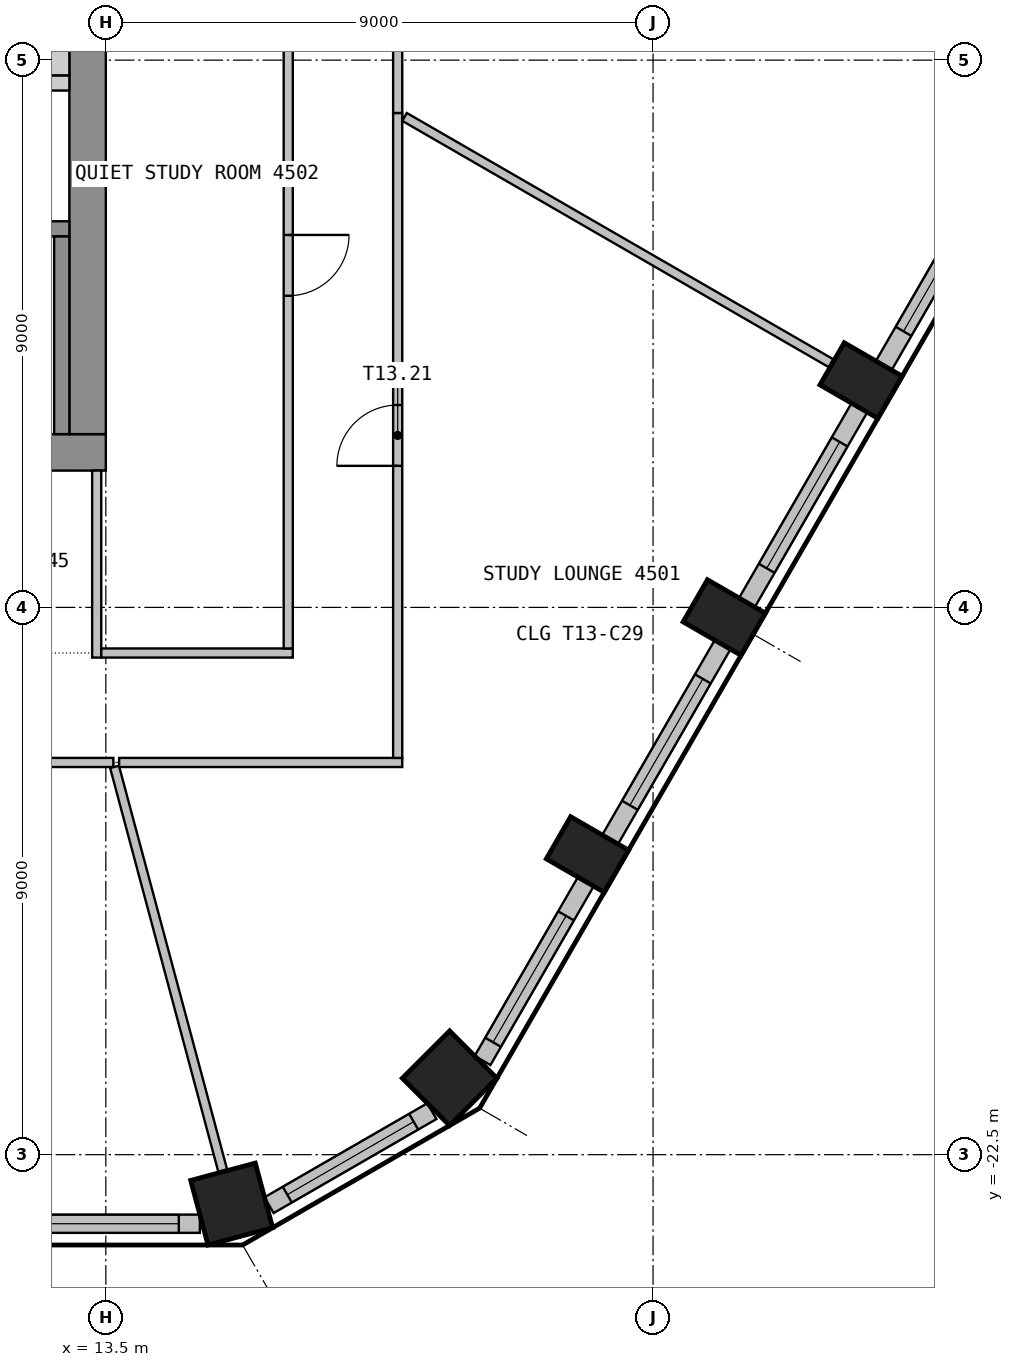
"""IFC4 building model, lengths in metres.
Left out: names, types, materials, properties, quantities, classifications, styles, units other than length and angle.
Written with IfcOpenShell. Run it as: python <this file> out.ifc"""

import sys

from ifc_helpers import new_model, si_unit, direction, frame, frame_2d, origin, origin_2d, place, context, subcontext, project, spatial, polyline, rectangle, outline, extrude, element, fill, save


model = new_model("IFC4")
c1 = context("Model", 3, precision=1e-05, world=origin(), true_north=direction((0.0, 1.0)))
c2 = subcontext(c1, "Body", "Model", "MODEL_VIEW")
j1 = project(units=[si_unit("LENGTHUNIT", "METRE"), si_unit("PLANEANGLEUNIT", "RADIAN")], contexts=[c1])
p1 = place(None, origin())
s1 = spatial("IfcSite", under=j1, at=p1, CompositionType="ELEMENT")
p2 = place(p1, origin())
s2 = spatial("IfcBuilding", under=s1, at=p2, CompositionType="ELEMENT")
p3 = place(p2, frame((0.0, 0.0, 183.9)))
s3 = spatial("IfcBuildingStorey", under=s2, at=p3, CompositionType="ELEMENT", Elevation=183.9)
for number, where, z_axis, x_axis in (
    (1, (15.57, -23.312, 0.0), (0.0, 0.0, 1.0), (0.966, 0.259, 0.0)),
    (2, (19.154, -21.242, 0.0), (0.0, 0.0, 1.0), (0.707, 0.707, 0.0)),
):
    element("IfcColumn", number, at=place(p3, frame(where, z_axis=z_axis, x_axis=x_axis)), inside=s3, PredefinedType="COLUMN", context=c2, shape_type="SweptSolid", body=[
        extrude(rectangle(XDim=1.1, YDim=1.1, at=origin_2d()), origin(), (0.0, 0.0, 1.0), 3.55),
    ])
for number, where, z_axis, x_axis in (
    (3, (21.421, -17.563, 0.0), (0.0, 0.0, 1.0), (0.5, 0.866, 0.0)),
    (4, (23.671, -13.666, 0.0), (0.0, 0.0, 1.0), (0.5, 0.866, 0.0)),
    (5, (25.921, -9.769, 0.0), (0.0, 0.0, 1.0), (0.5, 0.866, 0.0)),
):
    element("IfcColumn", number, at=place(p3, frame(where, z_axis=z_axis, x_axis=x_axis)), inside=s3, PredefinedType="COLUMN", context=c2, shape_type="SweptSolid", body=[
        extrude(rectangle(XDim=0.8, YDim=1.1, at=origin_2d()), origin(), (0.0, 0.0, 1.0), 3.55),
    ])
p4 = place(p3, frame((11.65, -23.635, 0.0), z_axis=(0.0, 0.0, 1.0), x_axis=(1.0, 0.0, 0.0)))
e6 = element("IfcWall", 6, at=p4, inside=s3, PredefinedType="SOLIDWALL", context=c2, shape_type="SweptSolid", body=[
    extrude(rectangle(XDim=3.396, YDim=0.3, at=frame_2d((1.698, 0.0))), origin(), (0.0, 0.0, 1.0), 3.55),
])
p5 = place(p4, frame((0.649, 0.0, 0.9)))
e7 = element("IfcOpeningElement", 7, at=p5, cuts=e6, PredefinedType="OPENING", context=c2, shape_type="SweptSolid", body=[
    extrude(rectangle(XDim=2.4, YDim=2.1, at=frame_2d((1.2, 1.05))), frame((0.0, 0.16, 0.0), z_axis=(0.0, -1.0, 0.0), x_axis=(1.0, 0.0, 0.0)), (0.0, 0.0, 1.0), 0.32),
])
p6 = place(p3, frame((16.184, -23.331, 0.0), z_axis=(0.0, 0.0, 1.0), x_axis=(0.865994975416, 0.500052699777, 0.0)))
e8 = element("IfcWall", 8, at=p6, inside=s3, PredefinedType="SOLIDWALL", context=c2, shape_type="SweptSolid", body=[
    extrude(rectangle(XDim=3.093, YDim=0.3, at=frame_2d((1.546, 0.0))), origin(), (0.0, 0.0, 1.0), 3.55),
])
p7 = place(p6, frame((0.346, 0.0, 0.9)))
e9 = element("IfcOpeningElement", 9, at=p7, cuts=e8, PredefinedType="OPENING", context=c2, shape_type="SweptSolid", body=[
    extrude(rectangle(XDim=2.4, YDim=2.1, at=frame_2d((1.2, 1.05))), frame((0.0, 0.16, 0.0), z_axis=(0.0, -1.0, 0.0), x_axis=(1.0, 0.0, 0.0)), (0.0, 0.0, 1.0), 0.32),
])
p8 = place(p3, frame((19.696, -20.951, 0.0), z_axis=(0.0, 0.0, 1.0), x_axis=(0.500012868213, 0.866017974191, 0.0)))
e10 = element("IfcWall", 10, at=p8, inside=s3, PredefinedType="SOLIDWALL", context=c2, shape_type="SweptSolid", body=[
    extrude(rectangle(XDim=3.396, YDim=0.3, at=frame_2d((1.698, 0.0))), origin(), (0.0, 0.0, 1.0), 3.55),
])
p9 = place(p8, frame((0.346, 0.0, 0.9)))
e11 = element("IfcOpeningElement", 11, at=p9, cuts=e10, PredefinedType="OPENING", context=c2, shape_type="SweptSolid", body=[
    extrude(rectangle(XDim=2.4, YDim=2.1, at=frame_2d((1.2, 1.05))), frame((0.0, 0.16, 0.0), z_axis=(0.0, -1.0, 0.0), x_axis=(1.0, 0.0, 0.0)), (0.0, 0.0, 1.0), 0.32),
])
p10 = place(p3, frame((21.794, -17.317, 0.0), z_axis=(0.0, 0.0, 1.0), x_axis=(0.500029062817, 0.866008623709, 0.0)))
e12 = element("IfcWall", 12, at=p10, inside=s3, PredefinedType="SOLIDWALL", context=c2, shape_type="SweptSolid", body=[
    extrude(rectangle(XDim=3.699, YDim=0.3, at=frame_2d((1.85, 0.0))), origin(), (0.0, 0.0, 1.0), 3.55),
])
p11 = place(p10, frame((0.649, 0.0, 0.9)))
e13 = element("IfcOpeningElement", 13, at=p11, cuts=e12, PredefinedType="OPENING", context=c2, shape_type="SweptSolid", body=[
    extrude(rectangle(XDim=2.4, YDim=2.1, at=frame_2d((1.2, 1.05))), frame((0.0, 0.16, 0.0), z_axis=(0.0, -1.0, 0.0), x_axis=(1.0, 0.0, 0.0)), (0.0, 0.0, 1.0), 0.32),
])
p12 = place(p3, frame((24.044, -13.419, 0.0), z_axis=(0.0, 0.0, 1.0), x_axis=(0.500029062817, 0.866008623709, 0.0)))
e14 = element("IfcWall", 14, at=p12, inside=s3, PredefinedType="SOLIDWALL", context=c2, shape_type="SweptSolid", body=[
    extrude(rectangle(XDim=3.699, YDim=0.3, at=frame_2d((1.85, 0.0))), origin(), (0.0, 0.0, 1.0), 3.55),
])
p13 = place(p12, frame((0.649, 0.0, 0.9)))
e15 = element("IfcOpeningElement", 15, at=p13, cuts=e14, PredefinedType="OPENING", context=c2, shape_type="SweptSolid", body=[
    extrude(rectangle(XDim=2.4, YDim=2.1, at=frame_2d((1.2, 1.05))), frame((0.0, 0.16, 0.0), z_axis=(0.0, -1.0, 0.0), x_axis=(1.0, 0.0, 0.0)), (0.0, 0.0, 1.0), 0.32),
])
p14 = place(p3, frame((26.294, -9.522, 0.0), z_axis=(0.0, 0.0, 1.0), x_axis=(0.500029062817, 0.866008623709, 0.0)))
e16 = element("IfcWall", 16, at=p14, inside=s3, PredefinedType="SOLIDWALL", context=c2, shape_type="SweptSolid", body=[
    extrude(rectangle(XDim=3.699, YDim=0.3, at=frame_2d((1.85, 0.0))), origin(), (0.0, 0.0, 1.0), 3.55),
])
p15 = place(p14, frame((0.649, 0.0, 0.9)))
e17 = element("IfcOpeningElement", 17, at=p15, cuts=e16, PredefinedType="OPENING", context=c2, shape_type="SweptSolid", body=[
    extrude(rectangle(XDim=2.4, YDim=2.1, at=frame_2d((1.2, 1.05))), frame((0.0, 0.16, 0.0), z_axis=(0.0, -1.0, 0.0), x_axis=(1.0, 0.0, 0.0)), (0.0, 0.0, 1.0), 0.32),
])
p16 = place(p3, frame((-13.5, -10.95, 0.0), z_axis=(0.0, 0.0, 1.0), x_axis=(1.0, 0.0, 0.0)))
e18 = element("IfcWall", 18, at=p16, inside=s3, PredefinedType="SHEAR", context=c2, shape_type="SweptSolid", body=[
    extrude(rectangle(XDim=27.0, YDim=0.6, at=frame_2d((13.5, 0.0))), origin(), (0.0, 0.0, 1.0), 3.55),
])
p17 = place(p16, frame((12.3, 0.0, 0.0)))
e19 = element("IfcOpeningElement", 19, at=p17, cuts=e18, PredefinedType="OPENING", context=c2, shape_type="SweptSolid", body=[
    extrude(rectangle(XDim=2.4, YDim=2.1, at=frame_2d((1.2, 1.05))), frame((0.0, 0.31, 0.0), z_axis=(0.0, -1.0, 0.0), x_axis=(1.0, 0.0, 0.0)), (0.0, 0.0, 1.0), 0.62),
])
p18 = place(p16, frame((1.05, 0.0, 0.0)))
e20 = element("IfcOpeningElement", 20, at=p18, cuts=e18, PredefinedType="OPENING", context=c2, shape_type="SweptSolid", body=[
    extrude(rectangle(XDim=1.2, YDim=2.1, at=frame_2d((0.6, 1.05))), frame((0.0, 0.31, 0.0), z_axis=(0.0, -1.0, 0.0), x_axis=(1.0, 0.0, 0.0)), (0.0, 0.0, 1.0), 0.62),
])
p19 = place(p16, frame((24.75, 0.0, 0.0)))
e21 = element("IfcOpeningElement", 21, at=p19, cuts=e18, PredefinedType="OPENING", context=c2, shape_type="SweptSolid", body=[
    extrude(rectangle(XDim=1.2, YDim=2.1, at=frame_2d((0.6, 1.05))), frame((0.0, 0.31, 0.0), z_axis=(0.0, -1.0, 0.0), x_axis=(1.0, 0.0, 0.0)), (0.0, 0.0, 1.0), 0.62),
])
p20 = place(p3, frame((13.2, -10.65, 0.0), z_axis=(0.0, 0.0, 1.0), x_axis=(0.0, 1.0, 0.0)))
e22 = element("IfcWall", 22, at=p20, inside=s3, PredefinedType="SHEAR", context=c2, shape_type="SweptSolid", body=[
    extrude(rectangle(XDim=21.3, YDim=0.6, at=frame_2d((10.65, 0.0))), origin(), (0.0, 0.0, 1.0), 3.55),
])
p21 = place(p20, frame((9.45, 0.0, 0.0)))
e23 = element("IfcOpeningElement", 23, at=p21, cuts=e22, PredefinedType="OPENING", context=c2, shape_type="SweptSolid", body=[
    extrude(rectangle(XDim=2.4, YDim=2.1, at=frame_2d((1.2, 1.05))), frame((0.0, 0.31, 0.0), z_axis=(0.0, -1.0, 0.0), x_axis=(1.0, 0.0, 0.0)), (0.0, 0.0, 1.0), 0.62),
])
p22 = place(p3, origin())
e24 = element("IfcWall", 24, at=p22, inside=s3, PredefinedType="SHEAR", context=c2, shape_type="SweptSolid", body=[
    extrude(outline(polyline([(-1.525, -5.0), (12.9, -5.0), (12.9, -4.75), (-1.525, -4.75), (-1.525, -5.0)])), origin(), (0.0, 0.0, 1.0), 3.55),
])
p23 = place(p3, origin())
e25 = element("IfcWall", 25, at=p23, inside=s3, PredefinedType="SHEAR", context=c2, shape_type="SweptSolid", body=[
    extrude(outline(polyline([(12.475, -4.75), (12.9, -4.75), (12.9, -2.05), (12.475, -2.05), (12.475, -4.75)])), origin(), (0.0, 0.0, 1.0), 3.55),
])
p24 = place(p3, frame((2.8, -7.275, 0.0), z_axis=(0.0, 0.0, 1.0), x_axis=(1.0, 0.0, 0.0)))
e26 = element("IfcWall", 26, at=p24, inside=s3, PredefinedType="SHEAR", context=c2, shape_type="SweptSolid", body=[
    extrude(rectangle(XDim=10.1, YDim=0.25, at=frame_2d((5.05, 0.0))), origin(), (0.0, 0.0, 1.0), 3.55),
])
p25 = place(p24, frame((8.45, 0.0, 0.0)))
e27 = element("IfcOpeningElement", 27, at=p25, cuts=e26, PredefinedType="OPENING", context=c2, shape_type="SweptSolid", body=[
    extrude(rectangle(XDim=1.2, YDim=2.1, at=frame_2d((0.6, 1.05))), frame((0.0, 0.135, 0.0), z_axis=(0.0, -1.0, 0.0), x_axis=(1.0, 0.0, 0.0)), (0.0, 0.0, 1.0), 0.27),
])
p26 = place(p3, frame((12.775, -10.65, 0.0), z_axis=(0.0, 0.0, 1.0), x_axis=(0.0, 1.0, 0.0)))
e28 = element("IfcWall", 28, at=p26, inside=s3, PredefinedType="SHEAR", context=c2, shape_type="SweptSolid", body=[
    extrude(rectangle(XDim=3.25, YDim=0.25, at=frame_2d((1.625, 0.0))), origin(), (0.0, 0.0, 1.0), 3.55),
])
p27 = place(p3, frame((6.75, -16.05, 0.0), z_axis=(0.0, 0.0, 1.0), x_axis=(1.0, 0.0, 0.0)))
e29 = element("IfcWall", 29, at=p27, inside=s3, PredefinedType="PARTITIONING", context=c2, shape_type="SweptSolid", body=[
    extrude(rectangle(XDim=6.874, YDim=0.15, at=frame_2d((3.437, 0.0))), origin(), (0.0, 0.0, 1.0), 3.55),
])
p28 = place(p27, frame((2.937, 0.0, 0.0)))
e30 = element("IfcOpeningElement", 30, at=p28, cuts=e29, PredefinedType="OPENING", context=c2, shape_type="SweptSolid", body=[
    extrude(rectangle(XDim=1.0, YDim=2.1, at=frame_2d((0.5, 1.05))), frame((0.0, 0.085, 0.0), z_axis=(0.0, -1.0, 0.0), x_axis=(1.0, 0.0, 0.0)), (0.0, 0.0, 1.0), 0.17),
])
p29 = place(p3, frame((13.35, -14.325, 0.0), z_axis=(0.0, 0.0, 1.0), x_axis=(0.0, 1.0, 0.0)))
e31 = element("IfcWall", 31, at=p29, inside=s3, PredefinedType="PARTITIONING", context=c2, shape_type="SweptSolid", body=[
    extrude(rectangle(XDim=3.075, YDim=0.15, at=frame_2d((1.538, 0.0))), origin(), (0.0, 0.0, 1.0), 3.55),
])
p30 = place(p3, frame((16.575, -14.25, 0.0), z_axis=(0.0, 0.0, 1.0), x_axis=(-1.0, 0.0, 0.0)))
e32 = element("IfcWall", 32, at=p30, inside=s3, PredefinedType="PARTITIONING", context=c2, shape_type="SweptSolid", body=[
    extrude(rectangle(XDim=3.15, YDim=0.15, at=frame_2d((1.575, 0.0))), origin(), (0.0, 0.0, 1.0), 3.55),
])
p31 = place(p3, frame((13.643, -16.122, 0.0), z_axis=(0.0, 0.0, 1.0), x_axis=(0.258807697684, -0.965928866749, 0.0)))
e33 = element("IfcWall", 33, at=p31, inside=s3, PredefinedType="PARTITIONING", context=c2, shape_type="SweptSolid", body=[
    extrude(rectangle(XDim=6.873, YDim=0.15, at=frame_2d((3.437, 0.0))), origin(), (0.0, 0.0, 1.0), 3.55),
])
p32 = place(p3, frame((13.719, -16.05, 0.0), z_axis=(0.0, 0.0, 1.0), x_axis=(1.0, 0.0, 0.0)))
e34 = element("IfcWall", 34, at=p32, inside=s3, PredefinedType="PARTITIONING", context=c2, shape_type="SweptSolid", body=[
    extrude(rectangle(XDim=4.656, YDim=0.15, at=frame_2d((2.328, 0.0))), origin(), (0.0, 0.0, 1.0), 3.55),
])
p33 = place(p3, frame((16.5, -1.575, 0.0), z_axis=(0.0, 0.0, 1.0), x_axis=(0.0, -1.0, 0.0)))
e35 = element("IfcWall", 35, at=p33, inside=s3, PredefinedType="PARTITIONING", context=c2, shape_type="SweptSolid", body=[
    extrude(rectangle(XDim=12.6, YDim=0.15, at=frame_2d((6.3, 0.0))), origin(), (0.0, 0.0, 1.0), 3.55),
])
p34 = place(p33, frame((5.8, 0.0, 0.0)))
e36 = element("IfcOpeningElement", 36, at=p34, cuts=e35, PredefinedType="OPENING", context=c2, shape_type="SweptSolid", body=[
    extrude(rectangle(XDim=1.0, YDim=2.1, at=frame_2d((0.5, 1.05))), frame((0.0, 0.085, 0.0), z_axis=(0.0, -1.0, 0.0), x_axis=(1.0, 0.0, 0.0)), (0.0, 0.0, 1.0), 0.17),
])
p35 = place(p3, frame((18.3, -15.975, 0.0), z_axis=(0.0, 0.0, 1.0), x_axis=(0.0, 1.0, 0.0)))
e37 = element("IfcWall", 37, at=p35, inside=s3, PredefinedType="PARTITIONING", context=c2, shape_type="SweptSolid", body=[
    extrude(rectangle(XDim=10.606, YDim=0.15, at=frame_2d((5.303, 0.0))), origin(), (0.0, 0.0, 1.0), 3.55),
])
p36 = place(p35, frame((4.803, 0.0, 0.0)))
e38 = element("IfcOpeningElement", 38, at=p36, cuts=e37, PredefinedType="OPENING", context=c2, shape_type="SweptSolid", body=[
    extrude(rectangle(XDim=1.0, YDim=2.1, at=frame_2d((0.5, 1.05))), frame((0.0, 0.085, 0.0), z_axis=(0.0, -1.0, 0.0), x_axis=(1.0, 0.0, 0.0)), (0.0, 0.0, 1.0), 0.17),
])
p37 = place(p3, frame((18.3, -5.369, 0.0), z_axis=(0.0, 0.0, 1.0), x_axis=(0.0, 1.0, 0.0)))
e39 = element("IfcWall", 39, at=p37, inside=s3, PredefinedType="PARTITIONING", context=c2, shape_type="SweptSolid", body=[
    extrude(rectangle(XDim=5.542, YDim=0.15, at=frame_2d((2.771, 0.0))), origin(), (0.0, 0.0, 1.0), 3.55),
])
p38 = place(p37, frame((2.271, 0.0, 0.0)))
e40 = element("IfcOpeningElement", 40, at=p38, cuts=e39, PredefinedType="OPENING", context=c2, shape_type="SweptSolid", body=[
    extrude(rectangle(XDim=1.0, YDim=2.1, at=frame_2d((0.5, 1.05))), frame((0.0, 0.085, 0.0), z_axis=(0.0, -1.0, 0.0), x_axis=(1.0, 0.0, 0.0)), (0.0, 0.0, 1.0), 0.17),
])
p39 = place(p3, frame((18.413, -5.434, 0.0), z_axis=(0.0, 0.0, 1.0), x_axis=(0.866017937352, -0.500012932018, 0.0)))
e41 = element("IfcWall", 41, at=p39, inside=s3, PredefinedType="PARTITIONING", context=c2, shape_type="SweptSolid", body=[
    extrude(rectangle(XDim=8.1, YDim=0.15, at=frame_2d((4.05, 0.0))), origin(), (0.0, 0.0, 1.0), 3.55),
])
p40 = place(p5, origin())
e42 = element("IfcWindow", 42, at=p40, inside=s3, PartitioningType="SINGLE_PANEL", PredefinedType="WINDOW", context=c2, shape_type="SweptSolid", body=[
    extrude(rectangle(XDim=2.4, YDim=2.1, at=frame_2d((1.2, 1.05))), frame((0.0, 0.03, 0.0), z_axis=(0.0, -1.0, 0.0), x_axis=(1.0, 0.0, 0.0)), (0.0, 0.0, 1.0), 0.06),
])
fill(e7, e42)
p41 = place(p7, origin())
e43 = element("IfcWindow", 43, at=p41, inside=s3, PartitioningType="SINGLE_PANEL", PredefinedType="WINDOW", context=c2, shape_type="SweptSolid", body=[
    extrude(rectangle(XDim=2.4, YDim=2.1, at=frame_2d((1.2, 1.05))), frame((0.0, 0.03, 0.0), z_axis=(0.0, -1.0, 0.0), x_axis=(1.0, 0.0, 0.0)), (0.0, 0.0, 1.0), 0.06),
])
fill(e9, e43)
p42 = place(p9, origin())
e44 = element("IfcWindow", 44, at=p42, inside=s3, PartitioningType="SINGLE_PANEL", PredefinedType="WINDOW", context=c2, shape_type="SweptSolid", body=[
    extrude(rectangle(XDim=2.4, YDim=2.1, at=frame_2d((1.2, 1.05))), frame((0.0, 0.03, 0.0), z_axis=(0.0, -1.0, 0.0), x_axis=(1.0, 0.0, 0.0)), (0.0, 0.0, 1.0), 0.06),
])
fill(e11, e44)
p43 = place(p11, origin())
e45 = element("IfcWindow", 45, at=p43, inside=s3, PartitioningType="SINGLE_PANEL", PredefinedType="WINDOW", context=c2, shape_type="SweptSolid", body=[
    extrude(rectangle(XDim=2.4, YDim=2.1, at=frame_2d((1.2, 1.05))), frame((0.0, 0.03, 0.0), z_axis=(0.0, -1.0, 0.0), x_axis=(1.0, 0.0, 0.0)), (0.0, 0.0, 1.0), 0.06),
])
fill(e13, e45)
p44 = place(p13, origin())
e46 = element("IfcWindow", 46, at=p44, inside=s3, PartitioningType="SINGLE_PANEL", PredefinedType="WINDOW", context=c2, shape_type="SweptSolid", body=[
    extrude(rectangle(XDim=2.4, YDim=2.1, at=frame_2d((1.2, 1.05))), frame((0.0, 0.03, 0.0), z_axis=(0.0, -1.0, 0.0), x_axis=(1.0, 0.0, 0.0)), (0.0, 0.0, 1.0), 0.06),
])
fill(e15, e46)
p45 = place(p15, origin())
e47 = element("IfcWindow", 47, at=p45, inside=s3, PartitioningType="SINGLE_PANEL", PredefinedType="WINDOW", context=c2, shape_type="SweptSolid", body=[
    extrude(rectangle(XDim=2.4, YDim=2.1, at=frame_2d((1.2, 1.05))), frame((0.0, 0.03, 0.0), z_axis=(0.0, -1.0, 0.0), x_axis=(1.0, 0.0, 0.0)), (0.0, 0.0, 1.0), 0.06),
])
fill(e17, e47)
p46 = place(p34, origin())
e48 = element("IfcDoor", 48, at=p46, inside=s3, OperationType="SINGLE_SWING_LEFT", PredefinedType="DOOR", context=c2, shape_type="SweptSolid", body=[
    extrude(rectangle(XDim=1.0, YDim=2.1, at=frame_2d((0.5, 1.05))), frame((0.0, 0.025, 0.0), z_axis=(0.0, -1.0, 0.0), x_axis=(1.0, 0.0, 0.0)), (0.0, 0.0, 1.0), 0.05),
])
fill(e36, e48)
p47 = place(p36, origin())
e49 = element("IfcDoor", 49, at=p47, inside=s3, OperationType="SINGLE_SWING_LEFT", PredefinedType="DOOR", context=c2, shape_type="SweptSolid", body=[
    extrude(rectangle(XDim=1.0, YDim=2.1, at=frame_2d((0.5, 1.05))), frame((0.0, 0.025, 0.0), z_axis=(0.0, -1.0, 0.0), x_axis=(1.0, 0.0, 0.0)), (0.0, 0.0, 1.0), 0.05),
])
fill(e38, e49)
save(model, sys.argv[1])
